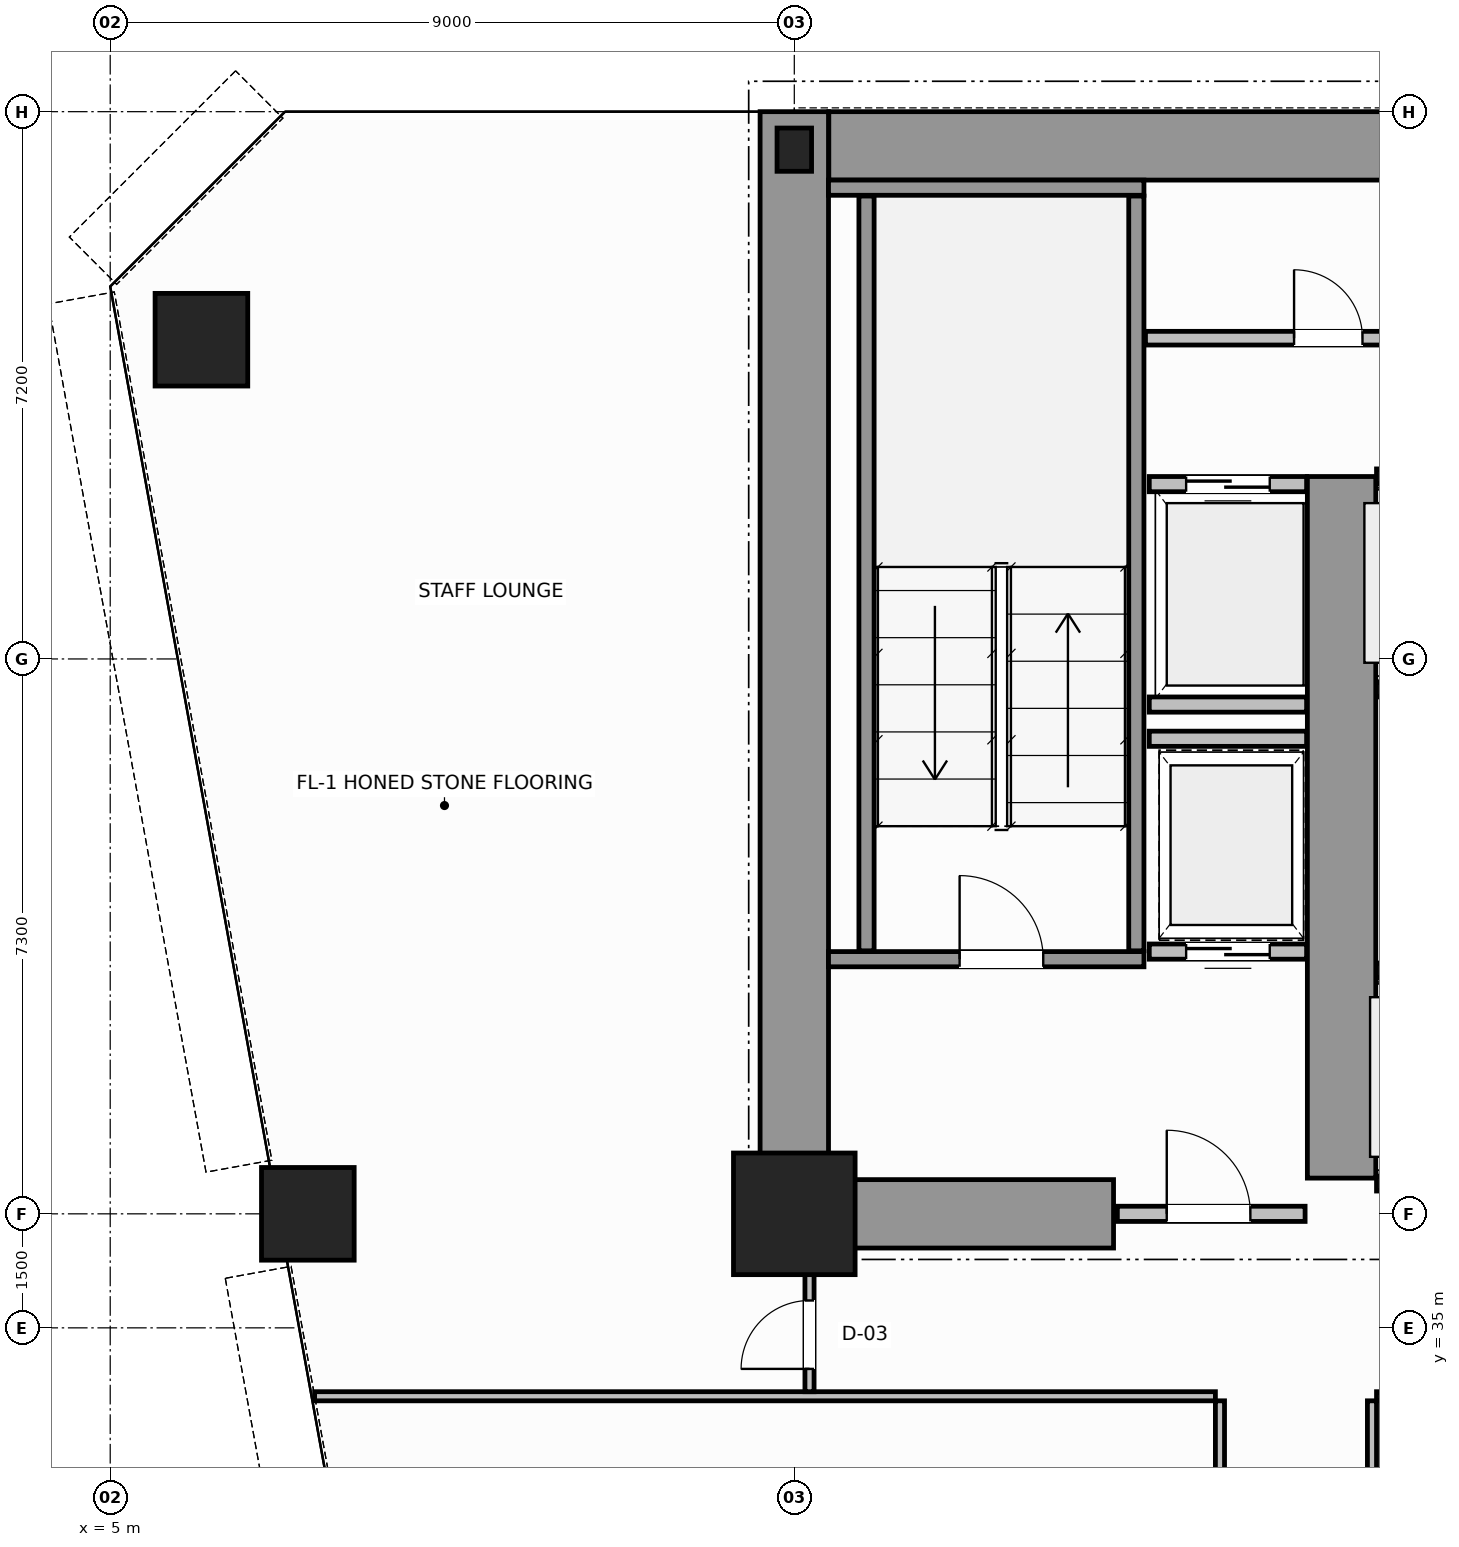
"""IFC4 building model, lengths in metres.
Left out: names, types, materials, properties, quantities, classifications, styles, units other than length and angle.
Written with IfcOpenShell. Run it as: python <this file> out.ifc"""

import sys

from ifc_helpers import new_model, si_unit, direction, frame, frame_2d, origin, origin_2d, place, context, subcontext, project, spatial, rectangle, hollow_circle, i_section, extrude, source, transform, mapped, element, fill, save


model = new_model("IFC4")
c1 = context("Model", 3, precision=1e-05, world=origin(), true_north=direction((0.0, 1.0)))
c2 = subcontext(c1, "Body", "Model", "MODEL_VIEW")
j1 = project(units=[si_unit("LENGTHUNIT", "METRE"), si_unit("PLANEANGLEUNIT", "RADIAN")], contexts=[c1])
p1 = place(None, origin())
s1 = spatial("IfcSite", under=j1, at=p1, CompositionType="ELEMENT")
p2 = place(p1, origin())
s2 = spatial("IfcBuilding", under=s1, at=p2, CompositionType="ELEMENT")
p3 = place(p2, frame((0.0, 0.0, 22.6)))
s3 = spatial("IfcBuildingStorey", under=s2, at=p3, CompositionType="ELEMENT", Elevation=22.6)
m1 = source(origin(), c2, "Body", "SweptSolid", [
    extrude(rectangle(XDim=1.6, YDim=1.6, at=origin_2d()), origin(), (0.0, 0.0, 1.0), 3.8),
])
p4 = place(p3, frame((14.0, 36.5, 0.0), z_axis=(0.0, 0.0, 1.0), x_axis=(1.0, 0.0, 0.0)))
e1 = element("IfcColumn", 1, at=p4, inside=s3, PredefinedType="COLUMN", context=c2, shape_type="MappedRepresentation", body=[
    mapped(m1, transform((0.0, 0.0, 0.0), scale=1.0)),
])
m2 = source(origin(), c2, "Body", "SweptSolid", [
    extrude(i_section(OverallWidth=0.454, OverallDepth=0.569, WebThickness=0.078, FlangeThickness=0.08, FilletRadius=0.015, at=origin_2d()), origin(), (0.0, 0.0, 1.0), 3.8),
])
p5 = place(p3, frame((14.0, 50.5, 0.0), z_axis=(0.0, 0.0, 1.0), x_axis=(1.0, 0.0, 0.0)))
e2 = element("IfcColumn", 2, at=p5, inside=s3, PredefinedType="COLUMN", context=c2, shape_type="MappedRepresentation", body=[
    mapped(m2, transform((0.0, 0.0, 0.0), scale=1.0)),
])
m3 = source(origin(), c2, "Body", "SweptSolid", [
    extrude(hollow_circle(Radius=0.61, WallThickness=0.05, at=origin_2d()), origin(), (0.0, 0.0, 1.0), 3.8),
])
for number, where, z_axis, x_axis in (
    (3, (6.2, 48.0, 0.0), (0.0, 0.0, 1.0), (1.0, 0.0, 0.0)),
    (4, (7.6, 36.5, 0.0), (0.0, 0.0, 1.0), (1.0, 0.0, 0.0)),
):
    element("IfcColumn", number, at=place(p3, frame(where, z_axis=z_axis, x_axis=x_axis)), inside=s3, PredefinedType="COLUMN", context=c2, shape_type="MappedRepresentation", body=[
        mapped(m3, transform((0.0, 0.0, 0.0), scale=1.0)),
    ])
p6 = place(p3, frame((14.454, 50.55, 0.0), z_axis=(0.0, 0.0, 1.0), x_axis=(1.0, 0.0, 0.0)))
e5 = element("IfcWall", 5, at=p6, inside=s3, PredefinedType="SHEAR", context=c2, shape_type="SweptSolid", body=[
    extrude(rectangle(XDim=19.544, YDim=0.9, at=frame_2d((9.772, 0.0))), origin(), (0.0, 0.0, 1.0), 3.8),
])
p7 = place(p3, frame((14.0, 36.5, 0.0), z_axis=(0.0, 0.0, 1.0), x_axis=(0.0, 1.0, 0.0)))
e6 = element("IfcWall", 6, at=p7, inside=s3, PredefinedType="SHEAR", context=c2, shape_type="SweptSolid", body=[
    extrude(rectangle(XDim=14.5, YDim=0.9, at=frame_2d((7.25, 0.0))), origin(), (0.0, 0.0, 1.0), 3.8),
])
p8 = place(p3, frame((14.47, 36.5, 0.0), z_axis=(0.0, 0.0, 1.0), x_axis=(1.0, 0.0, 0.0)))
e7 = element("IfcWall", 7, at=p8, inside=s3, PredefinedType="SHEAR", context=c2, shape_type="SweptSolid", body=[
    extrude(rectangle(XDim=3.73, YDim=0.9, at=frame_2d((1.865, 0.0))), origin(), (0.0, 0.0, 1.0), 2.38),
])
p9 = place(p3, frame((21.2, 36.97, 0.0), z_axis=(0.0, 0.0, 1.0), x_axis=(0.0, 1.0, 0.0)))
e8 = element("IfcWall", 8, at=p9, inside=s3, PredefinedType="SHEAR", context=c2, shape_type="SweptSolid", body=[
    extrude(rectangle(XDim=9.23, YDim=0.9, at=frame_2d((4.615, 0.0))), origin(), (0.0, 0.0, 1.0), 3.8),
])
p10 = place(p3, frame((14.45, 39.85, 0.0), z_axis=(0.0, 0.0, 1.0), x_axis=(1.0, 0.0, 0.0)))
e9 = element("IfcWall", 9, at=p10, inside=s3, PredefinedType="SOLIDWALL", context=c2, shape_type="SweptSolid", body=[
    extrude(rectangle(XDim=4.15, YDim=0.2, at=frame_2d((2.075, 0.0))), origin(), (0.0, 0.0, 1.0), 3.8),
])
p11 = place(p10, frame((1.725, 0.0, 0.0)))
e10 = element("IfcOpeningElement", 10, at=p11, cuts=e9, PredefinedType="OPENING", context=c2, shape_type="SweptSolid", body=[
    extrude(rectangle(XDim=1.1, YDim=2.15, at=frame_2d((0.55, 1.075))), frame((0.0, 0.11, 0.0), z_axis=(0.0, -1.0, 0.0), x_axis=(1.0, 0.0, 0.0)), (0.0, 0.0, 1.0), 0.22),
])
p12 = place(p3, frame((14.45, 50.0, 0.0), z_axis=(0.0, 0.0, 1.0), x_axis=(1.0, 0.0, 0.0)))
e11 = element("IfcWall", 11, at=p12, inside=s3, PredefinedType="SOLIDWALL", context=c2, shape_type="SweptSolid", body=[
    extrude(rectangle(XDim=4.15, YDim=0.2, at=frame_2d((2.075, 0.0))), origin(), (0.0, 0.0, 1.0), 3.8),
])
for number, where, z_axis, x_axis in (
    (12, (14.95, 39.96, 0.0), (0.0, 0.0, 1.0), (0.0, 1.0, 0.0)),
    (13, (18.5, 39.96, 0.0), (0.0, 0.0, 1.0), (0.0, 1.0, 0.0)),
):
    element("IfcWall", number, at=place(p3, frame(where, z_axis=z_axis, x_axis=x_axis)), inside=s3, PredefinedType="SOLIDWALL", context=c2, shape_type="SweptSolid", body=[
        extrude(rectangle(XDim=9.93, YDim=0.2, at=frame_2d((4.965, 0.0))), origin(), (0.0, 0.0, 1.0), 3.8),
    ])
p13 = place(p3, frame((18.25, 36.5, 0.0), z_axis=(0.0, 0.0, 1.0), x_axis=(1.0, 0.0, 0.0)))
e14 = element("IfcWall", 14, at=p13, inside=s3, PredefinedType="SOLIDWALL", context=c2, shape_type="SweptSolid", body=[
    extrude(rectangle(XDim=2.47, YDim=0.2, at=frame_2d((1.235, 0.0))), origin(), (0.0, 0.0, 1.0), 2.37),
])
p14 = place(p13, frame((0.65, 0.0, 0.0)))
e15 = element("IfcOpeningElement", 15, at=p14, cuts=e14, PredefinedType="OPENING", context=c2, shape_type="SweptSolid", body=[
    extrude(rectangle(XDim=1.1, YDim=2.15, at=frame_2d((0.55, 1.075))), frame((0.0, 0.11, 0.0), z_axis=(0.0, -1.0, 0.0), x_axis=(1.0, 0.0, 0.0)), (0.0, 0.0, 1.0), 0.22),
])
p15 = place(p3, frame((21.66, 39.7, 0.0), z_axis=(0.0, 0.0, 1.0), x_axis=(1.0, 0.0, 0.0)))
e16 = element("IfcWall", 16, at=p15, inside=s3, PredefinedType="SOLIDWALL", context=c2, shape_type="SweptSolid", body=[
    extrude(rectangle(XDim=1.77, YDim=0.2, at=frame_2d((0.885, 0.0))), origin(), (0.0, 0.0, 1.0), 3.58),
])
p16 = place(p15, frame((0.335, 0.0, 0.0)))
e17 = element("IfcOpeningElement", 17, at=p16, cuts=e16, PredefinedType="OPENING", context=c2, shape_type="SweptSolid", body=[
    extrude(rectangle(XDim=1.1, YDim=2.15, at=frame_2d((0.55, 1.075))), frame((0.0, 0.11, 0.0), z_axis=(0.0, -1.0, 0.0), x_axis=(1.0, 0.0, 0.0)), (0.0, 0.0, 1.0), 0.22),
])
p17 = place(p3, frame((21.66, 36.9, 0.0), z_axis=(0.0, 0.0, 1.0), x_axis=(1.0, 0.0, 0.0)))
e18 = element("IfcWall", 18, at=p17, inside=s3, PredefinedType="SOLIDWALL", context=c2, shape_type="SweptSolid", body=[
    extrude(rectangle(XDim=1.77, YDim=0.2, at=frame_2d((0.885, 0.0))), origin(), (0.0, 0.0, 1.0), 2.37),
])
p18 = place(p3, frame((21.66, 43.4, 0.0), z_axis=(0.0, 0.0, 1.0), x_axis=(1.0, 0.0, 0.0)))
e19 = element("IfcWall", 19, at=p18, inside=s3, PredefinedType="SOLIDWALL", context=c2, shape_type="SweptSolid", body=[
    extrude(rectangle(XDim=1.65, YDim=0.2, at=frame_2d((0.825, 0.0))), origin(), (0.0, 0.0, 1.0), 3.58),
])
p19 = place(p18, frame((0.275, 0.0, 0.0)))
e20 = element("IfcOpeningElement", 20, at=p19, cuts=e19, PredefinedType="OPENING", context=c2, shape_type="SweptSolid", body=[
    extrude(rectangle(XDim=1.1, YDim=2.15, at=frame_2d((0.55, 1.075))), frame((0.0, 0.11, 0.0), z_axis=(0.0, -1.0, 0.0), x_axis=(1.0, 0.0, 0.0)), (0.0, 0.0, 1.0), 0.22),
])
p20 = place(p3, frame((21.66, 46.2, 0.0), z_axis=(0.0, 0.0, 1.0), x_axis=(1.0, 0.0, 0.0)))
e21 = element("IfcWall", 21, at=p20, inside=s3, PredefinedType="SOLIDWALL", context=c2, shape_type="SweptSolid", body=[
    extrude(rectangle(XDim=1.65, YDim=0.2, at=frame_2d((0.825, 0.0))), origin(), (0.0, 0.0, 1.0), 3.58),
])
p21 = place(p3, frame((18.67, 46.1, 0.0), z_axis=(0.0, 0.0, 1.0), x_axis=(1.0, 0.0, 0.0)))
e22 = element("IfcWall", 22, at=p21, inside=s3, PredefinedType="SOLIDWALL", context=c2, shape_type="SweptSolid", body=[
    extrude(rectangle(XDim=2.07, YDim=0.2, at=frame_2d((1.035, 0.0))), origin(), (0.0, 0.0, 1.0), 3.58),
])
p22 = place(p21, frame((0.485, 0.0, 0.0)))
e23 = element("IfcOpeningElement", 23, at=p22, cuts=e22, PredefinedType="OPENING", context=c2, shape_type="SweptSolid", body=[
    extrude(rectangle(XDim=1.1, YDim=2.15, at=frame_2d((0.55, 1.075))), frame((0.0, 0.11, 0.0), z_axis=(0.0, -1.0, 0.0), x_axis=(1.0, 0.0, 0.0)), (0.0, 0.0, 1.0), 0.22),
])
p23 = place(p3, frame((18.67, 43.2, 0.0), z_axis=(0.0, 0.0, 1.0), x_axis=(1.0, 0.0, 0.0)))
e24 = element("IfcWall", 24, at=p23, inside=s3, PredefinedType="SOLIDWALL", context=c2, shape_type="SweptSolid", body=[
    extrude(rectangle(XDim=2.07, YDim=0.2, at=frame_2d((1.035, 0.0))), origin(), (0.0, 0.0, 1.0), 3.58),
])
p24 = place(p3, frame((18.67, 39.95, 0.0), z_axis=(0.0, 0.0, 1.0), x_axis=(1.0, 0.0, 0.0)))
e25 = element("IfcWall", 25, at=p24, inside=s3, PredefinedType="SOLIDWALL", context=c2, shape_type="SweptSolid", body=[
    extrude(rectangle(XDim=2.07, YDim=0.2, at=frame_2d((1.035, 0.0))), origin(), (0.0, 0.0, 1.0), 3.58),
])
p25 = place(p24, frame((0.485, 0.0, 0.0)))
e26 = element("IfcOpeningElement", 26, at=p25, cuts=e25, PredefinedType="OPENING", context=c2, shape_type="SweptSolid", body=[
    extrude(rectangle(XDim=1.1, YDim=2.15, at=frame_2d((0.55, 1.075))), frame((0.0, 0.11, 0.0), z_axis=(0.0, -1.0, 0.0), x_axis=(1.0, 0.0, 0.0)), (0.0, 0.0, 1.0), 0.22),
])
p26 = place(p3, frame((18.67, 42.75, 0.0), z_axis=(0.0, 0.0, 1.0), x_axis=(1.0, 0.0, 0.0)))
e27 = element("IfcWall", 27, at=p26, inside=s3, PredefinedType="SOLIDWALL", context=c2, shape_type="SweptSolid", body=[
    extrude(rectangle(XDim=2.07, YDim=0.2, at=frame_2d((1.035, 0.0))), origin(), (0.0, 0.0, 1.0), 3.58),
])
p27 = place(p3, frame((18.62, 48.02, 0.0), z_axis=(0.0, 0.0, 1.0), x_axis=(1.0, 0.0, 0.0)))
e28 = element("IfcWall", 28, at=p27, inside=s3, PredefinedType="PLUMBINGWALL", context=c2, shape_type="SweptSolid", body=[
    extrude(rectangle(XDim=30.76, YDim=0.18, at=frame_2d((15.38, 0.0))), origin(), (0.0, 0.0, 1.0), 3.58),
])
p28 = place(p27, frame((1.955, 0.0, 0.0)))
e29 = element("IfcOpeningElement", 29, at=p28, cuts=e28, PredefinedType="OPENING", context=c2, shape_type="SweptSolid", body=[
    extrude(rectangle(XDim=0.9, YDim=2.15, at=frame_2d((0.45, 1.075))), frame((0.0, 0.1, 0.0), z_axis=(0.0, -1.0, 0.0), x_axis=(1.0, 0.0, 0.0)), (0.0, 0.0, 1.0), 0.2),
])
p29 = place(p27, frame((8.03, 0.0, 0.0)))
e30 = element("IfcOpeningElement", 30, at=p29, cuts=e28, PredefinedType="OPENING", context=c2, shape_type="SweptSolid", body=[
    extrude(rectangle(XDim=0.9, YDim=2.15, at=frame_2d((0.45, 1.075))), frame((0.0, 0.1, 0.0), z_axis=(0.0, -1.0, 0.0), x_axis=(1.0, 0.0, 0.0)), (0.0, 0.0, 1.0), 0.2),
])
p30 = place(p27, frame((16.93, 0.0, 0.0)))
e31 = element("IfcOpeningElement", 31, at=p30, cuts=e28, PredefinedType="OPENING", context=c2, shape_type="SweptSolid", body=[
    extrude(rectangle(XDim=0.9, YDim=2.15, at=frame_2d((0.45, 1.075))), frame((0.0, 0.1, 0.0), z_axis=(0.0, -1.0, 0.0), x_axis=(1.0, 0.0, 0.0)), (0.0, 0.0, 1.0), 0.2),
])
p31 = place(p27, frame((26.205, 0.0, 0.0)))
e32 = element("IfcOpeningElement", 32, at=p31, cuts=e28, PredefinedType="OPENING", context=c2, shape_type="SweptSolid", body=[
    extrude(rectangle(XDim=0.9, YDim=2.15, at=frame_2d((0.45, 1.075))), frame((0.0, 0.1, 0.0), z_axis=(0.0, -1.0, 0.0), x_axis=(1.0, 0.0, 0.0)), (0.0, 0.0, 1.0), 0.2),
])
p32 = place(p3, frame((21.66, 34.1, 0.0), z_axis=(0.0, 0.0, 1.0), x_axis=(1.0, 0.0, 0.0)))
e33 = element("IfcWall", 33, at=p32, inside=s3, PredefinedType="PARTITIONING", context=c2, shape_type="SweptSolid", body=[
    extrude(rectangle(XDim=24.68, YDim=0.12, at=frame_2d((12.34, 0.0))), origin(), (0.0, 0.0, 1.0), 3.58),
])
p33 = place(p32, frame((1.79, 0.0, 0.0)))
e34 = element("IfcOpeningElement", 34, at=p33, cuts=e33, PredefinedType="OPENING", context=c2, shape_type="SweptSolid", body=[
    extrude(rectangle(XDim=0.9, YDim=2.15, at=frame_2d((0.45, 1.075))), frame((0.0, 0.07, 0.0), z_axis=(0.0, -1.0, 0.0), x_axis=(1.0, 0.0, 0.0)), (0.0, 0.0, 1.0), 0.14),
])
p34 = place(p32, frame((14.19, 0.0, 0.0)))
e35 = element("IfcOpeningElement", 35, at=p34, cuts=e33, PredefinedType="OPENING", context=c2, shape_type="SweptSolid", body=[
    extrude(rectangle(XDim=0.9, YDim=2.15, at=frame_2d((0.45, 1.075))), frame((0.0, 0.07, 0.0), z_axis=(0.0, -1.0, 0.0), x_axis=(1.0, 0.0, 0.0)), (0.0, 0.0, 1.0), 0.14),
])
p35 = place(p3, frame((7.689, 34.1, 0.0), z_axis=(0.0, 0.0, 1.0), x_axis=(1.0, 0.0, 0.0)))
e36 = element("IfcWall", 36, at=p35, inside=s3, PredefinedType="PARTITIONING", context=c2, shape_type="SweptSolid", body=[
    extrude(rectangle(XDim=11.851, YDim=0.12, at=frame_2d((5.926, 0.0))), origin(), (0.0, 0.0, 1.0), 3.58),
])
p36 = place(p3, frame((14.2, 34.16, 0.0), z_axis=(0.0, 0.0, 1.0), x_axis=(0.0, 1.0, 0.0)))
e37 = element("IfcWall", 37, at=p36, inside=s3, PredefinedType="PARTITIONING", context=c2, shape_type="SweptSolid", body=[
    extrude(rectangle(XDim=2.28, YDim=0.12, at=frame_2d((1.14, 0.0))), origin(), (0.0, 0.0, 1.0), 3.58),
])
p37 = place(p36, frame((0.3, 0.0, 0.0)))
e38 = element("IfcOpeningElement", 38, at=p37, cuts=e37, PredefinedType="OPENING", context=c2, shape_type="SweptSolid", body=[
    extrude(rectangle(XDim=0.9, YDim=2.15, at=frame_2d((0.45, 1.075))), frame((0.0, 0.07, 0.0), z_axis=(0.0, -1.0, 0.0), x_axis=(1.0, 0.0, 0.0)), (0.0, 0.0, 1.0), 0.14),
])
p38 = place(p3, frame((19.6, 15.8, 0.0), z_axis=(0.0, 0.0, 1.0), x_axis=(0.0, 1.0, 0.0)))
e39 = element("IfcWall", 39, at=p38, inside=s3, PredefinedType="PARTITIONING", context=c2, shape_type="SweptSolid", body=[
    extrude(rectangle(XDim=18.24, YDim=0.12, at=frame_2d((9.12, 0.0))), origin(), (0.0, 0.0, 1.0), 3.58),
])
p39 = place(p38, frame((4.05, 0.0, 0.0)))
e40 = element("IfcOpeningElement", 40, at=p39, cuts=e39, PredefinedType="OPENING", context=c2, shape_type="SweptSolid", body=[
    extrude(rectangle(XDim=0.9, YDim=2.15, at=frame_2d((0.45, 1.075))), frame((0.0, 0.07, 0.0), z_axis=(0.0, -1.0, 0.0), x_axis=(1.0, 0.0, 0.0)), (0.0, 0.0, 1.0), 0.14),
])
p40 = place(p38, frame((13.17, 0.0, 0.0)))
e41 = element("IfcOpeningElement", 41, at=p40, cuts=e39, PredefinedType="OPENING", context=c2, shape_type="SweptSolid", body=[
    extrude(rectangle(XDim=0.9, YDim=2.15, at=frame_2d((0.45, 1.075))), frame((0.0, 0.07, 0.0), z_axis=(0.0, -1.0, 0.0), x_axis=(1.0, 0.0, 0.0)), (0.0, 0.0, 1.0), 0.14),
])
p41 = place(p3, frame((21.6, 15.8, 0.0), z_axis=(0.0, 0.0, 1.0), x_axis=(0.0, 1.0, 0.0)))
e42 = element("IfcWall", 42, at=p41, inside=s3, PredefinedType="PARTITIONING", context=c2, shape_type="SweptSolid", body=[
    extrude(rectangle(XDim=18.24, YDim=0.12, at=frame_2d((9.12, 0.0))), origin(), (0.0, 0.0, 1.0), 3.58),
])
m4 = source(origin(), c2, "Body", "SweptSolid", [
    extrude(rectangle(XDim=1.1, YDim=2.15, at=frame_2d((0.55, 1.075))), frame((0.0, 0.025, 0.0), z_axis=(0.0, -1.0, 0.0), x_axis=(1.0, 0.0, 0.0)), (0.0, 0.0, 1.0), 0.05),
])
p42 = place(p11, origin())
e43 = element("IfcDoor", 43, at=p42, inside=s3, OperationType="SINGLE_SWING_LEFT", PredefinedType="DOOR", context=c2, shape_type="MappedRepresentation", body=[
    mapped(m4, transform((0.0, 0.0, 0.0), scale=1.0)),
])
fill(e10, e43)
p43 = place(p14, origin())
e44 = element("IfcDoor", 44, at=p43, inside=s3, OperationType="SINGLE_SWING_RIGHT", PredefinedType="DOOR", context=c2, shape_type="MappedRepresentation", body=[
    mapped(m4, transform((0.0, 0.0, 0.0), scale=1.0)),
])
fill(e15, e44)
p44 = place(p22, origin())
e45 = element("IfcDoor", 45, at=p44, inside=s3, OperationType="DOUBLE_DOOR_SLIDING", PredefinedType="DOOR", context=c2, shape_type="MappedRepresentation", body=[
    mapped(m4, transform((0.0, 0.0, 0.0), scale=1.0)),
])
fill(e23, e45)
p45 = place(p25, origin())
e46 = element("IfcDoor", 46, at=p45, inside=s3, OperationType="DOUBLE_DOOR_SLIDING", PredefinedType="DOOR", context=c2, shape_type="MappedRepresentation", body=[
    mapped(m4, transform((0.0, 0.0, 0.0), scale=1.0)),
])
fill(e26, e46)
m5 = source(origin(), c2, "Body", "SweptSolid", [
    extrude(rectangle(XDim=0.9, YDim=2.15, at=frame_2d((0.45, 1.075))), frame((0.0, 0.025, 0.0), z_axis=(0.0, -1.0, 0.0), x_axis=(1.0, 0.0, 0.0)), (0.0, 0.0, 1.0), 0.05),
])
p46 = place(p28, origin())
e47 = element("IfcDoor", 47, at=p46, inside=s3, OperationType="SINGLE_SWING_LEFT", PredefinedType="DOOR", context=c2, shape_type="MappedRepresentation", body=[
    mapped(m5, transform((0.0, 0.0, 0.0), scale=1.0)),
])
fill(e29, e47)
p47 = place(p37, origin())
e48 = element("IfcDoor", 48, at=p47, inside=s3, OperationType="SINGLE_SWING_LEFT", PredefinedType="DOOR", context=c2, shape_type="MappedRepresentation", body=[
    mapped(m5, transform((0.0, 0.0, 0.0), scale=1.0)),
])
fill(e38, e48)
save(model, sys.argv[1])
